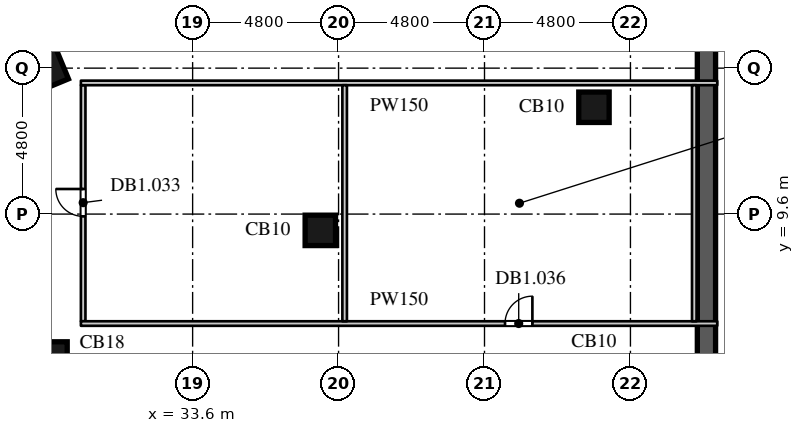
"""IFC4 building model, lengths in metres.
Left out: names, types, materials, properties, quantities, classifications, styles, units other than length and angle.
Written with IfcOpenShell. Run it as: python <this file> out.ifc"""

import sys

from ifc_helpers import new_model, si_unit, direction, frame, frame_2d, origin, origin_2d, place, context, subcontext, project, spatial, polyline, rectangle, outline, extrude, element, fill, save


model = new_model("IFC4")
c1 = context("Model", 3, precision=1e-05, world=origin(), true_north=direction((0.0, 1.0)))
c2 = subcontext(c1, "Body", "Model", "MODEL_VIEW")
j1 = project(units=[si_unit("LENGTHUNIT", "METRE"), si_unit("PLANEANGLEUNIT", "RADIAN")], contexts=[c1])
p1 = place(None, origin())
s1 = spatial("IfcSite", under=j1, at=p1, CompositionType="ELEMENT")
p2 = place(p1, origin())
s2 = spatial("IfcBuilding", under=s1, at=p2, CompositionType="ELEMENT")
p3 = place(p2, frame((0.0, 0.0, -4.5)))
s3 = spatial("IfcBuildingStorey", under=s2, at=p3, CompositionType="ELEMENT", Elevation=-4.5)
p4 = place(p3, origin())
e1 = element("IfcWall", 1, at=p4, inside=s3, PredefinedType="SOLIDWALL", context=c2, shape_type="SweptSolid", body=[
    extrude(outline(polyline([(50.8, 3.6), (50.8, 23.513), (50.2, 23.264), (50.2, 3.6), (50.8, 3.6)])), origin(), (0.0, 0.0, 1.0), 4.5),
])
p5 = place(p3, frame((28.575, 4.8, 0.0), z_axis=(0.0, 0.0, 1.0), x_axis=(0.0, 1.0, 0.0)))
e2 = element("IfcColumn", 2, at=p5, inside=s3, PredefinedType="COLUMN", context=c2, shape_type="SweptSolid", body=[
    extrude(rectangle(XDim=1.2, YDim=1.8, at=origin_2d()), origin(), (0.0, 0.0, 1.0), 4.5),
])
for number, where, z_axis, x_axis in (
    (3, (37.8, 9.064, 0.0), (0.0, 0.0, 1.0), (1.0, 0.0, 0.0)),
    (4, (46.8, 13.114, 0.0), (0.0, 0.0, 1.0), (1.0, 0.0, 0.0)),
):
    element("IfcColumn", number, at=place(p3, frame(where, z_axis=z_axis, x_axis=x_axis)), inside=s3, PredefinedType="COLUMN", context=c2, shape_type="SweptSolid", body=[
        extrude(rectangle(XDim=1.0, YDim=1.0, at=origin_2d()), origin(), (0.0, 0.0, 1.0), 4.5),
    ])
p6 = place(p3, frame((28.454, 14.257, 0.0), z_axis=(0.0, 0.0, 1.0), x_axis=(-0.382683496864, 0.923879505795, 0.0)))
e5 = element("IfcColumn", 5, at=p6, inside=s3, PredefinedType="COLUMN", context=c2, shape_type="SweptSolid", body=[
    extrude(rectangle(XDim=1.2, YDim=1.8, at=origin_2d()), origin(), (0.0, 0.0, 1.0), 4.5),
])
p7 = place(p3, frame((30.0, 6.075, 0.0), z_axis=(0.0, 0.0, 1.0), x_axis=(0.0, 1.0, 0.0)))
e6 = element("IfcWall", 6, at=p7, inside=s3, PredefinedType="PARTITIONING", context=c2, shape_type="SweptSolid", body=[
    extrude(rectangle(XDim=7.764, YDim=0.15, at=frame_2d((3.882, 0.0))), origin(), (0.0, 0.0, 1.0), 4.048),
])
p8 = place(p7, frame((3.45, 0.0, 0.0)))
e7 = element("IfcOpeningElement", 7, at=p8, cuts=e6, PredefinedType="OPENING", context=c2, shape_type="SweptSolid", body=[
    extrude(rectangle(XDim=0.9, YDim=2.2, at=frame_2d((0.45, 1.1))), frame((0.0, 0.085, 0.0), z_axis=(0.0, -1.0, 0.0), x_axis=(1.0, 0.0, 0.0)), (0.0, 0.0, 1.0), 0.17),
])
p9 = place(p3, frame((29.925, 6.0, 0.0), z_axis=(0.0, 0.0, 1.0), x_axis=(1.0, 0.0, 0.0)))
e8 = element("IfcWall", 8, at=p9, inside=s3, PredefinedType="PARTITIONING", context=c2, shape_type="SweptSolid", body=[
    extrude(rectangle(XDim=20.93, YDim=0.15, at=frame_2d((10.465, 0.0))), origin(), (0.0, 0.0, 1.0), 4.048),
])
p10 = place(p9, frame((13.95, 0.0, 0.0)))
e9 = element("IfcOpeningElement", 9, at=p10, cuts=e8, PredefinedType="OPENING", context=c2, shape_type="SweptSolid", body=[
    extrude(rectangle(XDim=0.9, YDim=2.2, at=frame_2d((0.45, 1.1))), frame((0.0, 0.085, 0.0), z_axis=(0.0, -1.0, 0.0), x_axis=(1.0, 0.0, 0.0)), (0.0, 0.0, 1.0), 0.17),
])
p11 = place(p3, frame((29.925, 13.914, 0.0), z_axis=(0.0, 0.0, 1.0), x_axis=(1.0, 0.0, 0.0)))
e10 = element("IfcWall", 10, at=p11, inside=s3, PredefinedType="PARTITIONING", context=c2, shape_type="SweptSolid", body=[
    extrude(rectangle(XDim=20.93, YDim=0.15, at=frame_2d((10.465, 0.0))), origin(), (0.0, 0.0, 1.0), 4.048),
])
for number, where, z_axis, x_axis in (
    (11, (38.6, 6.075, 0.0), (0.0, 0.0, 1.0), (0.0, 1.0, 0.0)),
    (12, (50.1, 6.075, 0.0), (0.0, 0.0, 1.0), (0.0, 1.0, 0.0)),
):
    element("IfcWall", number, at=place(p3, frame(where, z_axis=z_axis, x_axis=x_axis)), inside=s3, PredefinedType="PARTITIONING", context=c2, shape_type="SweptSolid", body=[
        extrude(rectangle(XDim=7.764, YDim=0.15, at=frame_2d((3.882, 0.0))), origin(), (0.0, 0.0, 1.0), 4.048),
    ])
p12 = place(p8, origin())
e13 = element("IfcDoor", 13, at=p12, inside=s3, OperationType="SINGLE_SWING_RIGHT", PredefinedType="DOOR", context=c2, shape_type="SweptSolid", body=[
    extrude(rectangle(XDim=0.9, YDim=2.2, at=frame_2d((0.45, 1.1))), frame((0.0, 0.025, 0.0), z_axis=(0.0, -1.0, 0.0), x_axis=(1.0, 0.0, 0.0)), (0.0, 0.0, 1.0), 0.05),
])
fill(e7, e13)
p13 = place(p10, origin())
e14 = element("IfcDoor", 14, at=p13, inside=s3, OperationType="SINGLE_SWING_RIGHT", PredefinedType="DOOR", context=c2, shape_type="SweptSolid", body=[
    extrude(rectangle(XDim=0.9, YDim=2.2, at=frame_2d((0.45, 1.1))), frame((0.0, 0.025, 0.0), z_axis=(0.0, -1.0, 0.0), x_axis=(1.0, 0.0, 0.0)), (0.0, 0.0, 1.0), 0.05),
])
fill(e9, e14)
save(model, sys.argv[1])
